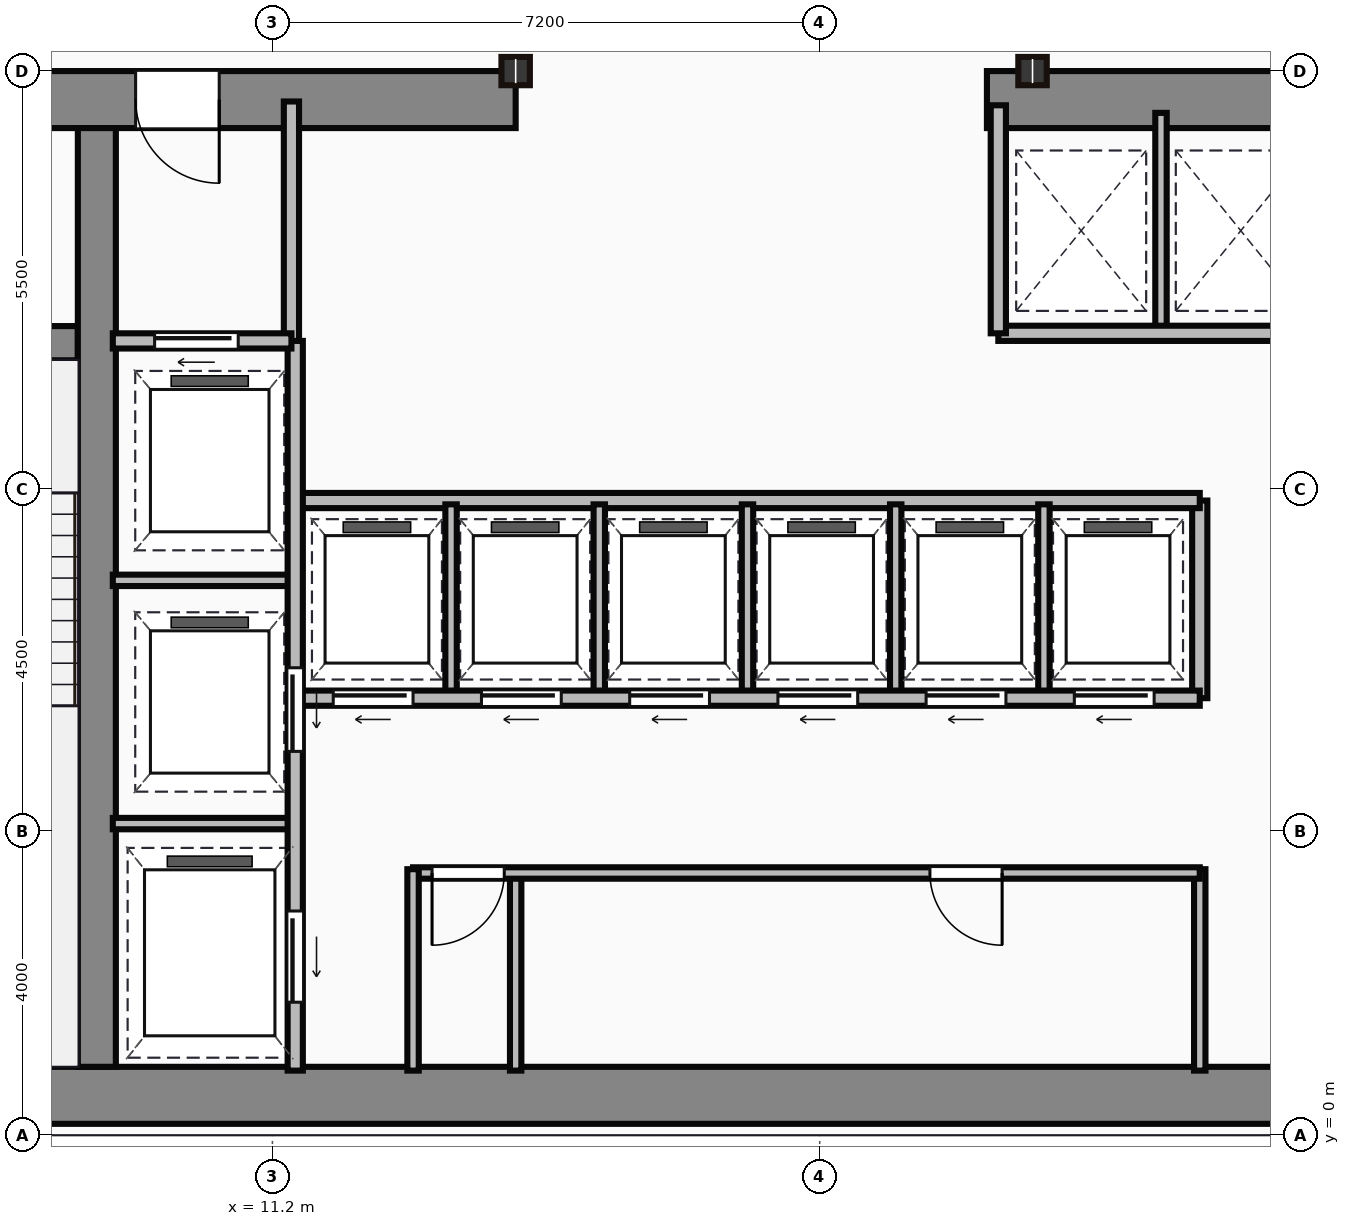
"""IFC4 building model, lengths in metres.
Left out: names, types, materials, properties, quantities, classifications, styles, units other than length and angle.
Written with IfcOpenShell. Run it as: python <this file> out.ifc"""

import sys

from ifc_helpers import new_model, si_unit, direction, frame, frame_2d, origin, origin_2d, place, context, subcontext, project, spatial, rectangle, i_section, extrude, source, transform, mapped, element, fill, save


model = new_model("IFC4")
c1 = context("Model", 3, precision=1e-05, world=origin(), true_north=direction((0.0, 1.0)))
c2 = subcontext(c1, "Body", "Model", "MODEL_VIEW")
j1 = project(units=[si_unit("LENGTHUNIT", "METRE"), si_unit("PLANEANGLEUNIT", "RADIAN")], contexts=[c1])
p1 = place(None, origin())
s1 = spatial("IfcSite", under=j1, at=p1, CompositionType="ELEMENT")
p2 = place(p1, origin())
s2 = spatial("IfcBuilding", under=s1, at=p2, CompositionType="ELEMENT")
p3 = place(p2, frame((0.0, 0.0, 166.15)))
s3 = spatial("IfcBuildingStorey", under=s2, at=p3, CompositionType="ELEMENT", Elevation=166.15)
m1 = source(origin(), c2, "Body", "SweptSolid", [
    extrude(rectangle(XDim=29.5, YDim=0.75, at=frame_2d((14.75, 0.0))), origin(), (0.0, 0.0, 1.0), 3.65),
])
p4 = place(p3, frame((4.5, 0.525, 0.0), z_axis=(0.0, 0.0, 1.0), x_axis=(1.0, 0.0, 0.0)))
e1 = element("IfcWall", 1, at=p4, inside=s3, PredefinedType="SHEAR", context=c2, shape_type="MappedRepresentation", body=[
    mapped(m1, transform((0.0, 0.0, 0.0))),
])
m2 = source(origin(), c2, "Body", "SweptSolid", [
    extrude(rectangle(XDim=9.1, YDim=0.75, at=frame_2d((4.55, 0.0))), origin(), (0.0, 0.0, 1.0), 3.65),
])
p5 = place(p3, frame((5.3, 13.625, 0.0), z_axis=(0.0, 0.0, 1.0), x_axis=(1.0, 0.0, 0.0)))
e2 = element("IfcWall", 2, at=p5, inside=s3, PredefinedType="SHEAR", context=c2, shape_type="MappedRepresentation", body=[
    mapped(m2, transform((0.0, 0.0, 0.0))),
])
p6 = place(p5, frame((4.1, 0.0, 0.0)))
e3 = element("IfcOpeningElement", 3, at=p6, cuts=e2, PredefinedType="OPENING", context=c2, shape_type="SweptSolid", body=[
    extrude(rectangle(XDim=1.1, YDim=2.15, at=frame_2d((0.55, 1.075))), frame((0.0, 0.385, 0.0), z_axis=(0.0, -1.0, 0.0), x_axis=(1.0, 0.0, 0.0)), (0.0, 0.0, 1.0), 0.77),
])
m3 = source(origin(), c2, "Body", "SweptSolid", [
    extrude(rectangle(XDim=12.6, YDim=0.75, at=frame_2d((6.3, 0.0))), origin(), (0.0, 0.0, 1.0), 3.65),
])
p7 = place(p3, frame((20.6, 13.625, 0.0), z_axis=(0.0, 0.0, 1.0), x_axis=(1.0, 0.0, 0.0)))
e4 = element("IfcWall", 4, at=p7, inside=s3, PredefinedType="SHEAR", context=c2, shape_type="MappedRepresentation", body=[
    mapped(m3, transform((0.0, 0.0, 0.0))),
])
p8 = place(p7, frame((9.25, 0.0, 0.0)))
e5 = element("IfcOpeningElement", 5, at=p8, cuts=e4, PredefinedType="OPENING", context=c2, shape_type="SweptSolid", body=[
    extrude(rectangle(XDim=1.1, YDim=2.15, at=frame_2d((0.55, 1.075))), frame((0.0, 0.385, 0.0), z_axis=(0.0, -1.0, 0.0), x_axis=(1.0, 0.0, 0.0)), (0.0, 0.0, 1.0), 0.77),
])
m4 = source(origin(), c2, "Body", "SweptSolid", [
    extrude(rectangle(XDim=12.35, YDim=0.5, at=frame_2d((6.175, 0.0))), origin(), (0.0, 0.0, 1.0), 3.65),
])
p9 = place(p3, frame((8.89, 0.9, 0.0), z_axis=(0.0, 0.0, 1.0), x_axis=(0.0, 1.0, 0.0)))
e6 = element("IfcWall", 6, at=p9, inside=s3, PredefinedType="SHEAR", context=c2, shape_type="MappedRepresentation", body=[
    mapped(m4, transform((0.0, 0.0, 0.0))),
])
m5 = source(origin(), c2, "Body", "SweptSolid", [
    extrude(rectangle(XDim=3.39, YDim=0.45, at=frame_2d((1.695, 0.0))), origin(), (0.0, 0.0, 1.0), 3.65),
])
p10 = place(p3, frame((5.25, 10.42, 0.0), z_axis=(0.0, 0.0, 1.0), x_axis=(1.0, 0.0, 0.0)))
e7 = element("IfcWall", 7, at=p10, inside=s3, PredefinedType="SHEAR", context=c2, shape_type="MappedRepresentation", body=[
    mapped(m5, transform((0.0, 0.0, 0.0))),
])
p11 = place(p10, frame((1.05, 0.0, 0.0)))
e8 = element("IfcOpeningElement", 8, at=p11, cuts=e7, PredefinedType="OPENING", context=c2, shape_type="SweptSolid", body=[
    extrude(rectangle(XDim=1.1, YDim=2.15, at=frame_2d((0.55, 1.075))), frame((0.0, 0.235, 0.0), z_axis=(0.0, -1.0, 0.0), x_axis=(1.0, 0.0, 0.0)), (0.0, 0.0, 1.0), 0.47),
])
m6 = source(origin(), c2, "Body", "SweptSolid", [
    extrude(i_section(OverallWidth=0.374, OverallDepth=0.372, WebThickness=0.016, FlangeThickness=0.026, at=origin_2d()), origin(), (0.0, 0.0, 1.0), 3.65),
])
for number, where, z_axis, x_axis in (
    (9, (14.4, 14.0, 0.0), (0.0, 0.0, 1.0), (1.0, 0.0, 0.0)),
    (10, (21.2, 14.0, 0.0), (0.0, 0.0, 1.0), (1.0, 0.0, 0.0)),
):
    element("IfcColumn", number, at=place(p3, frame(where, z_axis=z_axis, x_axis=x_axis)), inside=s3, PredefinedType="COLUMN", context=c2, shape_type="MappedRepresentation", body=[
        mapped(m6, transform((0.0, 0.0, 0.0))),
    ])
m7 = source(origin(), c2, "Body", "SweptSolid", [
    extrude(rectangle(XDim=3.18, YDim=0.2, at=frame_2d((1.59, 0.0))), origin(), (0.0, 0.0, 1.0), 3.4),
])
p12 = place(p3, frame((11.45, 10.42, 0.0), z_axis=(0.0, 0.0, 1.0), x_axis=(0.0, 1.0, 0.0)))
e11 = element("IfcWall", 11, at=p12, inside=s3, PredefinedType="PARTITIONING", context=c2, shape_type="MappedRepresentation", body=[
    mapped(m7, transform((0.0, 0.0, 0.0))),
])
m8 = source(origin(), c2, "Body", "SweptSolid", [
    extrude(rectangle(XDim=2.35, YDim=0.2, at=frame_2d((1.175, 0.0))), origin(), (0.0, 0.0, 1.0), 3.4),
])
p13 = place(p3, frame((9.1, 10.45, 0.0), z_axis=(0.0, 0.0, 1.0), x_axis=(1.0, 0.0, 0.0)))
e12 = element("IfcWall", 12, at=p13, inside=s3, PredefinedType="PARTITIONING", context=c2, shape_type="MappedRepresentation", body=[
    mapped(m8, transform((0.0, 0.0, 0.0))),
])
p14 = place(p13, frame((0.55, 0.0, 0.0)))
e13 = element("IfcOpeningElement", 13, at=p14, cuts=e12, PredefinedType="OPENING", context=c2, shape_type="SweptSolid", body=[
    extrude(rectangle(XDim=1.1, YDim=2.15, at=frame_2d((0.55, 1.075))), frame((0.0, 0.11, 0.0), z_axis=(0.0, -1.0, 0.0), x_axis=(1.0, 0.0, 0.0)), (0.0, 0.0, 1.0), 0.22),
])
m9 = source(origin(), c2, "Body", "SweptSolid", [
    extrude(rectangle(XDim=9.6, YDim=0.2, at=frame_2d((4.8, 0.0))), origin(), (0.0, 0.0, 1.0), 3.4),
])
p15 = place(p3, frame((11.5, 0.85, 0.0), z_axis=(0.0, 0.0, 1.0), x_axis=(0.0, 1.0, 0.0)))
e14 = element("IfcWall", 14, at=p15, inside=s3, PredefinedType="PARTITIONING", context=c2, shape_type="MappedRepresentation", body=[
    mapped(m9, transform((0.0, 0.0, 0.0))),
])
p16 = place(p15, frame((4.2, 0.0, 0.0)))
e15 = element("IfcOpeningElement", 15, at=p16, cuts=e14, PredefinedType="OPENING", context=c2, shape_type="SweptSolid", body=[
    extrude(rectangle(XDim=1.1, YDim=2.15, at=frame_2d((0.55, 1.075))), frame((0.0, 0.11, 0.0), z_axis=(0.0, -1.0, 0.0), x_axis=(1.0, 0.0, 0.0)), (0.0, 0.0, 1.0), 0.22),
])
p17 = place(p15, frame((0.9, 0.0, 0.0)))
e16 = element("IfcOpeningElement", 16, at=p17, cuts=e14, PredefinedType="OPENING", context=c2, shape_type="SweptSolid", body=[
    extrude(rectangle(XDim=1.2, YDim=2.15, at=frame_2d((0.6, 1.075))), frame((0.0, 0.11, 0.0), z_axis=(0.0, -1.0, 0.0), x_axis=(1.0, 0.0, 0.0)), (0.0, 0.0, 1.0), 0.22),
])
m10 = source(origin(), c2, "Body", "SweptSolid", [
    extrude(rectangle(XDim=2.4, YDim=0.15, at=frame_2d((1.2, 0.0))), origin(), (0.0, 0.0, 1.0), 3.4),
])
for number, where, z_axis, x_axis in (
    (17, (9.1, 4.1, 0.0), (0.0, 0.0, 1.0), (1.0, 0.0, 0.0)),
    (18, (9.1, 7.3, 0.0), (0.0, 0.0, 1.0), (1.0, 0.0, 0.0)),
):
    element("IfcWall", number, at=place(p3, frame(where, z_axis=z_axis, x_axis=x_axis)), inside=s3, PredefinedType="PARTITIONING", context=c2, shape_type="MappedRepresentation", body=[
        mapped(m10, transform((0.0, 0.0, 0.0))),
    ])
m11 = source(origin(), c2, "Body", "SweptSolid", [
    extrude(rectangle(XDim=2.65, YDim=0.15, at=frame_2d((1.325, 0.0))), origin(), (0.0, 0.0, 1.0), 3.4),
])
p18 = place(p3, frame((13.05, 0.85, 0.0), z_axis=(0.0, 0.0, 1.0), x_axis=(0.0, 1.0, 0.0)))
e19 = element("IfcWall", 19, at=p18, inside=s3, PredefinedType="PARTITIONING", context=c2, shape_type="MappedRepresentation", body=[
    mapped(m11, transform((0.0, 0.0, 0.0))),
])
m12 = source(origin(), c2, "Body", "SweptSolid", [
    extrude(rectangle(XDim=10.35, YDim=0.15, at=frame_2d((5.175, 0.0))), origin(), (0.0, 0.0, 1.0), 3.4),
])
p19 = place(p3, frame((13.05, 3.45, 0.0), z_axis=(0.0, 0.0, 1.0), x_axis=(1.0, 0.0, 0.0)))
e20 = element("IfcWall", 20, at=p19, inside=s3, PredefinedType="PARTITIONING", context=c2, shape_type="MappedRepresentation", body=[
    mapped(m12, transform((0.0, 0.0, 0.0))),
])
p20 = place(p19, frame((0.25, 0.0, 0.0)))
e21 = element("IfcOpeningElement", 21, at=p20, cuts=e20, PredefinedType="OPENING", context=c2, shape_type="SweptSolid", body=[
    extrude(rectangle(XDim=0.95, YDim=2.15, at=frame_2d((0.475, 1.075))), frame((0.0, 0.085, 0.0), z_axis=(0.0, -1.0, 0.0), x_axis=(1.0, 0.0, 0.0)), (0.0, 0.0, 1.0), 0.17),
])
p21 = place(p19, frame((6.8, 0.0, 0.0)))
e22 = element("IfcOpeningElement", 22, at=p21, cuts=e20, PredefinedType="OPENING", context=c2, shape_type="SweptSolid", body=[
    extrude(rectangle(XDim=0.95, YDim=2.15, at=frame_2d((0.475, 1.075))), frame((0.0, 0.085, 0.0), z_axis=(0.0, -1.0, 0.0), x_axis=(1.0, 0.0, 0.0)), (0.0, 0.0, 1.0), 0.17),
])
p22 = place(p3, frame((23.4, 0.85, 0.0), z_axis=(0.0, 0.0, 1.0), x_axis=(0.0, 1.0, 0.0)))
e23 = element("IfcWall", 23, at=p22, inside=s3, PredefinedType="PARTITIONING", context=c2, shape_type="MappedRepresentation", body=[
    mapped(m11, transform((0.0, 0.0, 0.0))),
])
m13 = source(origin(), c2, "Body", "SweptSolid", [
    extrude(rectangle(XDim=2.6, YDim=0.15, at=frame_2d((1.3, 0.0))), origin(), (0.0, 0.0, 1.0), 3.4),
])
p23 = place(p3, frame((14.4, 0.85, 0.0), z_axis=(0.0, 0.0, 1.0), x_axis=(0.0, 1.0, 0.0)))
e24 = element("IfcWall", 24, at=p23, inside=s3, PredefinedType="PARTITIONING", context=c2, shape_type="MappedRepresentation", body=[
    mapped(m13, transform((0.0, 0.0, 0.0))),
])
m14 = source(origin(), c2, "Body", "SweptSolid", [
    extrude(rectangle(XDim=11.85, YDim=0.2, at=frame_2d((5.925, 0.0))), origin(), (0.0, 0.0, 1.0), 3.4),
])
p24 = place(p3, frame((11.55, 5.75, 0.0), z_axis=(0.0, 0.0, 1.0), x_axis=(1.0, 0.0, 0.0)))
e25 = element("IfcWall", 25, at=p24, inside=s3, PredefinedType="PARTITIONING", context=c2, shape_type="MappedRepresentation", body=[
    mapped(m14, transform((0.0, 0.0, 0.0))),
])
p25 = place(p24, frame((0.45, 0.0, 0.0)))
e26 = element("IfcOpeningElement", 26, at=p25, cuts=e25, PredefinedType="OPENING", context=c2, shape_type="SweptSolid", body=[
    extrude(rectangle(XDim=1.05, YDim=2.15, at=frame_2d((0.525, 1.075))), frame((0.0, 0.11, 0.0), z_axis=(0.0, -1.0, 0.0), x_axis=(1.0, 0.0, 0.0)), (0.0, 0.0, 1.0), 0.22),
])
p26 = place(p24, frame((2.4, 0.0, 0.0)))
e27 = element("IfcOpeningElement", 27, at=p26, cuts=e25, PredefinedType="OPENING", context=c2, shape_type="SweptSolid", body=[
    extrude(rectangle(XDim=1.05, YDim=2.15, at=frame_2d((0.525, 1.075))), frame((0.0, 0.11, 0.0), z_axis=(0.0, -1.0, 0.0), x_axis=(1.0, 0.0, 0.0)), (0.0, 0.0, 1.0), 0.22),
])
p27 = place(p24, frame((4.35, 0.0, 0.0)))
e28 = element("IfcOpeningElement", 28, at=p27, cuts=e25, PredefinedType="OPENING", context=c2, shape_type="SweptSolid", body=[
    extrude(rectangle(XDim=1.05, YDim=2.15, at=frame_2d((0.525, 1.075))), frame((0.0, 0.11, 0.0), z_axis=(0.0, -1.0, 0.0), x_axis=(1.0, 0.0, 0.0)), (0.0, 0.0, 1.0), 0.22),
])
p28 = place(p24, frame((6.3, 0.0, 0.0)))
e29 = element("IfcOpeningElement", 29, at=p28, cuts=e25, PredefinedType="OPENING", context=c2, shape_type="SweptSolid", body=[
    extrude(rectangle(XDim=1.05, YDim=2.15, at=frame_2d((0.525, 1.075))), frame((0.0, 0.11, 0.0), z_axis=(0.0, -1.0, 0.0), x_axis=(1.0, 0.0, 0.0)), (0.0, 0.0, 1.0), 0.22),
])
p29 = place(p24, frame((8.25, 0.0, 0.0)))
e30 = element("IfcOpeningElement", 30, at=p29, cuts=e25, PredefinedType="OPENING", context=c2, shape_type="SweptSolid", body=[
    extrude(rectangle(XDim=1.05, YDim=2.15, at=frame_2d((0.525, 1.075))), frame((0.0, 0.11, 0.0), z_axis=(0.0, -1.0, 0.0), x_axis=(1.0, 0.0, 0.0)), (0.0, 0.0, 1.0), 0.22),
])
p30 = place(p24, frame((10.2, 0.0, 0.0)))
e31 = element("IfcOpeningElement", 31, at=p30, cuts=e25, PredefinedType="OPENING", context=c2, shape_type="SweptSolid", body=[
    extrude(rectangle(XDim=1.05, YDim=2.15, at=frame_2d((0.525, 1.075))), frame((0.0, 0.11, 0.0), z_axis=(0.0, -1.0, 0.0), x_axis=(1.0, 0.0, 0.0)), (0.0, 0.0, 1.0), 0.22),
])
p31 = place(p3, frame((11.55, 8.35, 0.0), z_axis=(0.0, 0.0, 1.0), x_axis=(1.0, 0.0, 0.0)))
e32 = element("IfcWall", 32, at=p31, inside=s3, PredefinedType="PARTITIONING", context=c2, shape_type="MappedRepresentation", body=[
    mapped(m14, transform((0.0, 0.0, 0.0))),
])
m15 = source(origin(), c2, "Body", "SweptSolid", [
    extrude(rectangle(XDim=2.6, YDim=0.2, at=frame_2d((1.3, 0.0))), origin(), (0.0, 0.0, 1.0), 3.4),
])
p32 = place(p3, frame((23.4, 5.75, 0.0), z_axis=(0.0, 0.0, 1.0), x_axis=(0.0, 1.0, 0.0)))
e33 = element("IfcWall", 33, at=p32, inside=s3, PredefinedType="PARTITIONING", context=c2, shape_type="MappedRepresentation", body=[
    mapped(m15, transform((0.0, 0.0, 0.0))),
])
m16 = source(origin(), c2, "Body", "SweptSolid", [
    extrude(rectangle(XDim=2.5, YDim=0.15, at=frame_2d((1.25, 0.0))), origin(), (0.0, 0.0, 1.0), 3.4),
])
for number, where, z_axis, x_axis in (
    (34, (13.55, 5.8, 0.0), (0.0, 0.0, 1.0), (0.0, 1.0, 0.0)),
    (35, (15.5, 5.8, 0.0), (0.0, 0.0, 1.0), (0.0, 1.0, 0.0)),
    (36, (17.45, 5.8, 0.0), (0.0, 0.0, 1.0), (0.0, 1.0, 0.0)),
    (37, (19.4, 5.8, 0.0), (0.0, 0.0, 1.0), (0.0, 1.0, 0.0)),
    (38, (21.35, 5.8, 0.0), (0.0, 0.0, 1.0), (0.0, 1.0, 0.0)),
):
    element("IfcWall", number, at=place(p3, frame(where, z_axis=z_axis, x_axis=x_axis)), inside=s3, PredefinedType="PARTITIONING", context=c2, shape_type="MappedRepresentation", body=[
        mapped(m16, transform((0.0, 0.0, 0.0))),
    ])
m17 = source(origin(), c2, "Body", "SweptSolid", [
    extrude(rectangle(XDim=8.8, YDim=0.2, at=frame_2d((4.4, 0.0))), origin(), (0.0, 0.0, 1.0), 3.4),
])
p33 = place(p3, frame((20.75, 10.55, 0.0), z_axis=(0.0, 0.0, 1.0), x_axis=(1.0, 0.0, 0.0)))
e39 = element("IfcWall", 39, at=p33, inside=s3, PredefinedType="PARTITIONING", context=c2, shape_type="MappedRepresentation", body=[
    mapped(m17, transform((0.0, 0.0, 0.0))),
])
m18 = source(origin(), c2, "Body", "SweptSolid", [
    extrude(rectangle(XDim=3.0, YDim=0.2, at=frame_2d((1.5, 0.0))), origin(), (0.0, 0.0, 1.0), 3.4),
])
p34 = place(p3, frame((20.75, 10.55, 0.0), z_axis=(0.0, 0.0, 1.0), x_axis=(0.0, 1.0, 0.0)))
e40 = element("IfcWall", 40, at=p34, inside=s3, PredefinedType="PARTITIONING", context=c2, shape_type="MappedRepresentation", body=[
    mapped(m18, transform((0.0, 0.0, 0.0))),
])
m19 = source(origin(), c2, "Body", "SweptSolid", [
    extrude(rectangle(XDim=2.85, YDim=0.15, at=frame_2d((1.425, 0.0))), origin(), (0.0, 0.0, 1.0), 3.4),
])
p35 = place(p3, frame((22.89, 10.6, 0.0), z_axis=(0.0, 0.0, 1.0), x_axis=(0.0, 1.0, 0.0)))
e41 = element("IfcWall", 41, at=p35, inside=s3, PredefinedType="PARTITIONING", context=c2, shape_type="MappedRepresentation", body=[
    mapped(m19, transform((0.0, 0.0, 0.0))),
])
m20 = source(origin(), c2, "Body", "SweptSolid", [
    extrude(rectangle(XDim=1.1, YDim=2.15, at=frame_2d((0.55, 1.075))), frame((0.0, 0.025, 0.0), z_axis=(0.0, -1.0, 0.0), x_axis=(1.0, 0.0, 0.0)), (0.0, 0.0, 1.0), 0.05),
])
p36 = place(p6, origin())
e42 = element("IfcDoor", 42, at=p36, inside=s3, OperationType="SINGLE_SWING_RIGHT", PredefinedType="DOOR", context=c2, shape_type="MappedRepresentation", body=[
    mapped(m20, transform((0.0, 0.0, 0.0))),
])
fill(e3, e42)
p37 = place(p14, origin())
e43 = element("IfcDoor", 43, at=p37, inside=s3, OperationType="SLIDING_TO_LEFT", PredefinedType="DOOR", context=c2, shape_type="MappedRepresentation", body=[
    mapped(m20, transform((0.0, 0.0, 0.0))),
])
fill(e13, e43)
p38 = place(p16, frame((1.1, 0.0, 0.0), z_axis=(0.0, 0.0, 1.0), x_axis=(-1.0, 0.0, 0.0)))
e44 = element("IfcDoor", 44, at=p38, inside=s3, OperationType="SLIDING_TO_LEFT", PredefinedType="DOOR", context=c2, shape_type="MappedRepresentation", body=[
    mapped(m20, transform((0.0, 0.0, 0.0))),
])
fill(e15, e44)
m21 = source(origin(), c2, "Body", "SweptSolid", [
    extrude(rectangle(XDim=1.2, YDim=2.15, at=frame_2d((0.6, 1.075))), frame((0.0, 0.025, 0.0), z_axis=(0.0, -1.0, 0.0), x_axis=(1.0, 0.0, 0.0)), (0.0, 0.0, 1.0), 0.05),
])
p39 = place(p17, frame((1.2, 0.0, 0.0), z_axis=(0.0, 0.0, 1.0), x_axis=(-1.0, 0.0, 0.0)))
e45 = element("IfcDoor", 45, at=p39, inside=s3, OperationType="SLIDING_TO_LEFT", PredefinedType="DOOR", context=c2, shape_type="MappedRepresentation", body=[
    mapped(m21, transform((0.0, 0.0, 0.0))),
])
fill(e16, e45)
m22 = source(origin(), c2, "Body", "SweptSolid", [
    extrude(rectangle(XDim=0.95, YDim=2.15, at=frame_2d((0.475, 1.075))), frame((0.0, 0.025, 0.0), z_axis=(0.0, -1.0, 0.0), x_axis=(1.0, 0.0, 0.0)), (0.0, 0.0, 1.0), 0.05),
])
p40 = place(p20, origin())
e46 = element("IfcDoor", 46, at=p40, inside=s3, OperationType="SINGLE_SWING_LEFT", PredefinedType="DOOR", context=c2, shape_type="MappedRepresentation", body=[
    mapped(m22, transform((0.0, 0.0, 0.0))),
])
fill(e21, e46)
p41 = place(p21, origin())
e47 = element("IfcDoor", 47, at=p41, inside=s3, OperationType="SINGLE_SWING_RIGHT", PredefinedType="DOOR", context=c2, shape_type="MappedRepresentation", body=[
    mapped(m22, transform((0.0, 0.0, 0.0))),
])
fill(e22, e47)
m23 = source(origin(), c2, "Body", "SweptSolid", [
    extrude(rectangle(XDim=1.05, YDim=2.15, at=frame_2d((0.525, 1.075))), frame((0.0, 0.025, 0.0), z_axis=(0.0, -1.0, 0.0), x_axis=(1.0, 0.0, 0.0)), (0.0, 0.0, 1.0), 0.05),
])
p42 = place(p25, frame((1.05, 0.0, 0.0), z_axis=(0.0, 0.0, 1.0), x_axis=(-1.0, 0.0, 0.0)))
e48 = element("IfcDoor", 48, at=p42, inside=s3, OperationType="SLIDING_TO_LEFT", PredefinedType="DOOR", context=c2, shape_type="MappedRepresentation", body=[
    mapped(m23, transform((0.0, 0.0, 0.0))),
])
fill(e26, e48)
p43 = place(p26, frame((1.05, 0.0, 0.0), z_axis=(0.0, 0.0, 1.0), x_axis=(-1.0, 0.0, 0.0)))
e49 = element("IfcDoor", 49, at=p43, inside=s3, OperationType="SLIDING_TO_LEFT", PredefinedType="DOOR", context=c2, shape_type="MappedRepresentation", body=[
    mapped(m23, transform((0.0, 0.0, 0.0))),
])
fill(e27, e49)
p44 = place(p27, frame((1.05, 0.0, 0.0), z_axis=(0.0, 0.0, 1.0), x_axis=(-1.0, 0.0, 0.0)))
e50 = element("IfcDoor", 50, at=p44, inside=s3, OperationType="SLIDING_TO_LEFT", PredefinedType="DOOR", context=c2, shape_type="MappedRepresentation", body=[
    mapped(m23, transform((0.0, 0.0, 0.0))),
])
fill(e28, e50)
p45 = place(p28, frame((1.05, 0.0, 0.0), z_axis=(0.0, 0.0, 1.0), x_axis=(-1.0, 0.0, 0.0)))
e51 = element("IfcDoor", 51, at=p45, inside=s3, OperationType="SLIDING_TO_LEFT", PredefinedType="DOOR", context=c2, shape_type="MappedRepresentation", body=[
    mapped(m23, transform((0.0, 0.0, 0.0))),
])
fill(e29, e51)
p46 = place(p29, frame((1.05, 0.0, 0.0), z_axis=(0.0, 0.0, 1.0), x_axis=(-1.0, 0.0, 0.0)))
e52 = element("IfcDoor", 52, at=p46, inside=s3, OperationType="SLIDING_TO_LEFT", PredefinedType="DOOR", context=c2, shape_type="MappedRepresentation", body=[
    mapped(m23, transform((0.0, 0.0, 0.0))),
])
fill(e30, e52)
p47 = place(p30, frame((1.05, 0.0, 0.0), z_axis=(0.0, 0.0, 1.0), x_axis=(-1.0, 0.0, 0.0)))
e53 = element("IfcDoor", 53, at=p47, inside=s3, OperationType="SLIDING_TO_LEFT", PredefinedType="DOOR", context=c2, shape_type="MappedRepresentation", body=[
    mapped(m23, transform((0.0, 0.0, 0.0))),
])
fill(e31, e53)
save(model, sys.argv[1])
